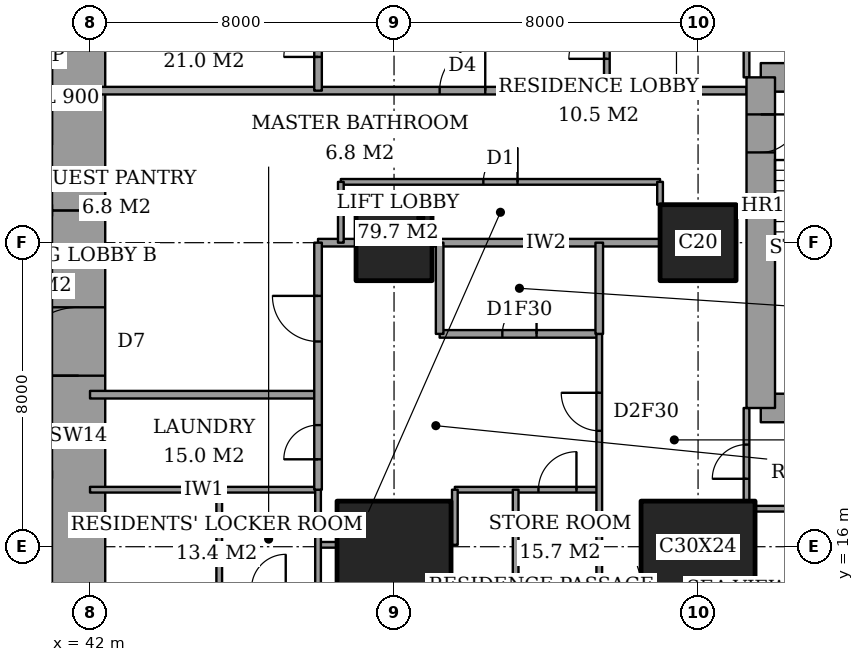
"""IFC4 building model, lengths in metres.
Left out: names, types, materials, properties, quantities, classifications, styles, units other than length and angle.
Written with IfcOpenShell. Run it as: python <this file> out.ifc"""

import sys

from ifc_helpers import new_model, si_unit, direction, frame, frame_2d, origin, origin_2d, place, context, subcontext, project, spatial, rectangle, extrude, element, fill, save


model = new_model("IFC4")
c1 = context("Model", 3, precision=1e-05, world=origin(), true_north=direction((0.0, 1.0)))
c2 = subcontext(c1, "Body", "Model", "MODEL_VIEW")
j1 = project(units=[si_unit("LENGTHUNIT", "METRE"), si_unit("PLANEANGLEUNIT", "RADIAN")], contexts=[c1])
p1 = place(None, origin())
s1 = spatial("IfcSite", under=j1, at=p1, CompositionType="ELEMENT")
p2 = place(p1, origin())
s2 = spatial("IfcBuilding", under=s1, at=p2, CompositionType="ELEMENT")
p3 = place(p2, frame((0.0, 0.0, 51.2)))
s3 = spatial("IfcBuildingStorey", under=s2, at=p3, CompositionType="ELEMENT", Elevation=51.2)
p4 = place(p3, frame((50.0, 16.0, 0.0), z_axis=(0.0, 0.0, 1.0), x_axis=(1.0, 0.0, 0.0)))
e1 = element("IfcColumn", 1, at=p4, inside=s3, PredefinedType="COLUMN", context=c2, shape_type="SweptSolid", body=[
    extrude(rectangle(XDim=3.0, YDim=2.4, at=origin_2d()), origin(), (0.0, 0.0, 1.0), 3.6),
])
p5 = place(p3, frame((50.0, 24.0, 0.0), z_axis=(0.0, 0.0, 1.0), x_axis=(1.0, 0.0, 0.0)))
e2 = element("IfcColumn", 2, at=p5, inside=s3, PredefinedType="COLUMN", context=c2, shape_type="SweptSolid", body=[
    extrude(rectangle(XDim=2.0, YDim=2.0, at=origin_2d()), origin(), (0.0, 0.0, 1.0), 3.6),
])
p6 = place(p3, frame((58.0, 16.0, 0.0), z_axis=(0.0, 0.0, 1.0), x_axis=(1.0, 0.0, 0.0)))
e3 = element("IfcColumn", 3, at=p6, inside=s3, PredefinedType="COLUMN", context=c2, shape_type="SweptSolid", body=[
    extrude(rectangle(XDim=3.0, YDim=2.4, at=origin_2d()), origin(), (0.0, 0.0, 1.0), 3.6),
])
p7 = place(p3, frame((58.0, 24.0, 0.0), z_axis=(0.0, 0.0, 1.0), x_axis=(1.0, 0.0, 0.0)))
e4 = element("IfcColumn", 4, at=p7, inside=s3, PredefinedType="COLUMN", context=c2, shape_type="SweptSolid", body=[
    extrude(rectangle(XDim=2.0, YDim=2.0, at=origin_2d()), origin(), (0.0, 0.0, 1.0), 3.6),
])
p8 = place(p3, frame((41.7, 13.0, 0.0), z_axis=(0.0, 0.0, 1.0), x_axis=(0.0, 1.0, 0.0)))
e5 = element("IfcWall", 5, at=p8, inside=s3, PredefinedType="SHEAR", context=c2, shape_type="SweptSolid", body=[
    extrude(rectangle(XDim=11.85, YDim=1.4, at=frame_2d((5.925, 0.0))), origin(), (0.0, 0.0, 1.0), 3.6),
])
p9 = place(p8, frame((7.5, 0.0, 0.0)))
e6 = element("IfcOpeningElement", 6, at=p9, cuts=e5, PredefinedType="OPENING", context=c2, shape_type="SweptSolid", body=[
    extrude(rectangle(XDim=1.8, YDim=2.4, at=frame_2d((0.9, 1.2))), frame((0.0, 0.71, 0.0), z_axis=(0.0, -1.0, 0.0), x_axis=(1.0, 0.0, 0.0)), (0.0, 0.0, 1.0), 1.42),
])
p10 = place(p3, frame((41.7, 24.85, 0.0), z_axis=(0.0, 0.0, 1.0), x_axis=(0.0, 1.0, 0.0)))
e7 = element("IfcWall", 7, at=p10, inside=s3, PredefinedType="SHEAR", context=c2, shape_type="SweptSolid", body=[
    extrude(rectangle(XDim=10.15, YDim=1.4, at=frame_2d((5.075, 0.0))), origin(), (0.0, 0.0, 1.0), 3.6),
])
for number, where, z_axis, x_axis in (
    (8, (59.65, 19.65, 0.0), (0.0, 0.0, 1.0), (1.0, 0.0, 0.0)),
    (9, (64.1, 28.35, 0.0), (0.0, 0.0, 1.0), (-1.0, 0.0, 0.0)),
):
    element("IfcWall", number, at=place(p3, frame(where, z_axis=z_axis, x_axis=x_axis)), inside=s3, PredefinedType="SHEAR", context=c2, shape_type="SweptSolid", body=[
        extrude(rectangle(XDim=4.45, YDim=0.75, at=frame_2d((2.225, 0.0))), origin(), (0.0, 0.0, 1.0), 3.6),
    ])
p11 = place(p3, frame((59.65, 28.35, 0.0), z_axis=(0.0, 0.0, 1.0), x_axis=(0.0, -1.0, 0.0)))
e10 = element("IfcWall", 10, at=p11, inside=s3, PredefinedType="SHEAR", context=c2, shape_type="SweptSolid", body=[
    extrude(rectangle(XDim=8.7, YDim=0.75, at=frame_2d((4.35, 0.0))), origin(), (0.0, 0.0, 1.0), 3.6),
])
p12 = place(p11, frame((0.975, 0.0, 0.0)))
e11 = element("IfcOpeningElement", 11, at=p12, cuts=e10, PredefinedType="OPENING", context=c2, shape_type="SweptSolid", body=[
    extrude(rectangle(XDim=1.0, YDim=2.1, at=frame_2d((0.5, 1.05))), frame((0.0, 0.385, 0.0), z_axis=(0.0, -1.0, 0.0), x_axis=(1.0, 0.0, 0.0)), (0.0, 0.0, 1.0), 0.77),
])
p13 = place(p3, frame((55.4, 15.0, 0.0), z_axis=(0.0, 0.0, 1.0), x_axis=(1.0, 0.0, 0.0)))
e12 = element("IfcWall", 12, at=p13, inside=s3, PredefinedType="PARTITIONING", context=c2, shape_type="SweptSolid", body=[
    extrude(rectangle(XDim=1.1, YDim=0.15, at=frame_2d((0.55, 0.0))), origin(), (0.0, 0.0, 1.0), 3.35),
])
p14 = place(p3, frame((48.0, 16.05, 0.0), z_axis=(0.0, 0.0, 1.0), x_axis=(1.0, 0.0, 0.0)))
e13 = element("IfcWall", 13, at=p14, inside=s3, PredefinedType="PARTITIONING", context=c2, shape_type="SweptSolid", body=[
    extrude(rectangle(XDim=0.5, YDim=0.15, at=frame_2d((0.25, 0.0))), origin(), (0.0, 0.0, 1.0), 2.634),
])
p15 = place(p3, frame((59.5, 17.0, 0.0), z_axis=(0.0, 0.0, 1.0), x_axis=(1.0, 0.0, 0.0)))
e14 = element("IfcWall", 14, at=p15, inside=s3, PredefinedType="PARTITIONING", context=c2, shape_type="SweptSolid", body=[
    extrude(rectangle(XDim=5.15, YDim=0.15, at=frame_2d((2.575, 0.0))), origin(), (0.0, 0.0, 1.0), 3.35),
])
p16 = place(p3, frame((42.0, 17.5, 0.0), z_axis=(0.0, 0.0, 1.0), x_axis=(1.0, 0.0, 0.0)))
e15 = element("IfcWall", 15, at=p16, inside=s3, PredefinedType="PARTITIONING", context=c2, shape_type="SweptSolid", body=[
    extrude(rectangle(XDim=6.0, YDim=0.15, at=frame_2d((3.0, 0.0))), origin(), (0.0, 0.0, 1.0), 3.35),
])
p17 = place(p3, frame((51.6, 17.5, 0.0), z_axis=(0.0, 0.0, 1.0), x_axis=(1.0, 0.0, 0.0)))
e16 = element("IfcWall", 16, at=p17, inside=s3, PredefinedType="PARTITIONING", context=c2, shape_type="SweptSolid", body=[
    extrude(rectangle(XDim=3.8, YDim=0.15, at=frame_2d((1.9, 0.0))), origin(), (0.0, 0.0, 1.0), 3.35),
])
p18 = place(p17, frame((2.2, 0.0, 0.0)))
e17 = element("IfcOpeningElement", 17, at=p18, cuts=e16, PredefinedType="OPENING", context=c2, shape_type="SweptSolid", body=[
    extrude(rectangle(XDim=1.0, YDim=2.1, at=frame_2d((0.5, 1.05))), frame((0.0, 0.085, 0.0), z_axis=(0.0, -1.0, 0.0), x_axis=(1.0, 0.0, 0.0)), (0.0, 0.0, 1.0), 0.17),
])
p19 = place(p3, frame((42.0, 20.0, 0.0), z_axis=(0.0, 0.0, 1.0), x_axis=(1.0, 0.0, 0.0)))
e18 = element("IfcWall", 18, at=p19, inside=s3, PredefinedType="PARTITIONING", context=c2, shape_type="SweptSolid", body=[
    extrude(rectangle(XDim=6.0, YDim=0.2, at=frame_2d((3.0, 0.0))), origin(), (0.0, 0.0, 1.0), 3.35),
])
p20 = place(p3, frame((51.2, 21.6, 0.0), z_axis=(0.0, 0.0, 1.0), x_axis=(1.0, 0.0, 0.0)))
e19 = element("IfcWall", 19, at=p20, inside=s3, PredefinedType="PARTITIONING", context=c2, shape_type="SweptSolid", body=[
    extrude(rectangle(XDim=4.2, YDim=0.2, at=frame_2d((2.1, 0.0))), origin(), (0.0, 0.0, 1.0), 3.35),
])
p21 = place(p20, frame((1.65, 0.0, 0.0)))
e20 = element("IfcOpeningElement", 20, at=p21, cuts=e19, PredefinedType="OPENING", context=c2, shape_type="SweptSolid", body=[
    extrude(rectangle(XDim=0.9, YDim=2.1, at=frame_2d((0.45, 1.05))), frame((0.0, 0.11, 0.0), z_axis=(0.0, -1.0, 0.0), x_axis=(1.0, 0.0, 0.0)), (0.0, 0.0, 1.0), 0.22),
])
p22 = place(p3, frame((48.0, 24.0, 0.0), z_axis=(0.0, 0.0, 1.0), x_axis=(1.0, 0.0, 0.0)))
e21 = element("IfcWall", 21, at=p22, inside=s3, PredefinedType="PARTITIONING", context=c2, shape_type="SweptSolid", body=[
    extrude(rectangle(XDim=1.0, YDim=0.2, at=frame_2d((0.5, 0.0))), origin(), (0.0, 0.0, 1.0), 3.35),
])
p23 = place(p3, frame((51.0, 24.0, 0.0), z_axis=(0.0, 0.0, 1.0), x_axis=(1.0, 0.0, 0.0)))
e22 = element("IfcWall", 22, at=p23, inside=s3, PredefinedType="PARTITIONING", context=c2, shape_type="SweptSolid", body=[
    extrude(rectangle(XDim=6.0, YDim=0.2, at=frame_2d((3.0, 0.0))), origin(), (0.0, 0.0, 1.0), 3.35),
])
p24 = place(p3, frame((48.6, 25.6, 0.0), z_axis=(0.0, 0.0, 1.0), x_axis=(1.0, 0.0, 0.0)))
e23 = element("IfcWall", 23, at=p24, inside=s3, PredefinedType="PARTITIONING", context=c2, shape_type="SweptSolid", body=[
    extrude(rectangle(XDim=8.4, YDim=0.15, at=frame_2d((4.2, 0.0))), origin(), (0.0, 0.0, 1.0), 3.35),
])
p25 = place(p24, frame((3.75, 0.0, 0.0)))
e24 = element("IfcOpeningElement", 24, at=p25, cuts=e23, PredefinedType="OPENING", context=c2, shape_type="SweptSolid", body=[
    extrude(rectangle(XDim=0.9, YDim=2.1, at=frame_2d((0.45, 1.05))), frame((0.0, 0.085, 0.0), z_axis=(0.0, -1.0, 0.0), x_axis=(1.0, 0.0, 0.0)), (0.0, 0.0, 1.0), 0.17),
])
p26 = place(p3, frame((42.0, 28.0, 0.0), z_axis=(0.0, 0.0, 1.0), x_axis=(1.0, 0.0, 0.0)))
e25 = element("IfcWall", 25, at=p26, inside=s3, PredefinedType="PARTITIONING", context=c2, shape_type="SweptSolid", body=[
    extrude(rectangle(XDim=17.275, YDim=0.2, at=frame_2d((8.637, 0.0))), origin(), (0.0, 0.0, 1.0), 3.35),
])
p27 = place(p26, frame((9.2, 0.0, 0.0)))
e26 = element("IfcOpeningElement", 26, at=p27, cuts=e25, PredefinedType="OPENING", context=c2, shape_type="SweptSolid", body=[
    extrude(rectangle(XDim=1.2, YDim=2.4, at=frame_2d((0.6, 1.2))), frame((0.0, 0.11, 0.0), z_axis=(0.0, -1.0, 0.0), x_axis=(1.0, 0.0, 0.0)), (0.0, 0.0, 1.0), 0.22),
])
p28 = place(p3, frame((45.4, 14.9, 0.0), z_axis=(0.0, 0.0, 1.0), x_axis=(0.0, 1.0, 0.0)))
e27 = element("IfcWall", 27, at=p28, inside=s3, PredefinedType="PARTITIONING", context=c2, shape_type="SweptSolid", body=[
    extrude(rectangle(XDim=2.6, YDim=0.15, at=frame_2d((1.3, 0.0))), origin(), (0.0, 0.0, 1.0), 3.35),
])
p29 = place(p3, frame((48.0, 17.5, 0.0), z_axis=(0.0, 0.0, 1.0), x_axis=(0.0, 1.0, 0.0)))
e28 = element("IfcWall", 28, at=p29, inside=s3, PredefinedType="PARTITIONING", context=c2, shape_type="SweptSolid", body=[
    extrude(rectangle(XDim=6.5, YDim=0.2, at=frame_2d((3.25, 0.0))), origin(), (0.0, 0.0, 1.0), 3.35),
])
p30 = place(p29, frame((3.9, 0.0, 0.0)))
e29 = element("IfcOpeningElement", 29, at=p30, cuts=e28, PredefinedType="OPENING", context=c2, shape_type="SweptSolid", body=[
    extrude(rectangle(XDim=1.2, YDim=2.4, at=frame_2d((0.6, 1.2))), frame((0.0, 0.11, 0.0), z_axis=(0.0, -1.0, 0.0), x_axis=(1.0, 0.0, 0.0)), (0.0, 0.0, 1.0), 0.22),
])
p31 = place(p29, frame((0.8, 0.0, 0.0)))
e30 = element("IfcOpeningElement", 30, at=p31, cuts=e28, PredefinedType="OPENING", context=c2, shape_type="SweptSolid", body=[
    extrude(rectangle(XDim=0.9, YDim=2.1, at=frame_2d((0.45, 1.05))), frame((0.0, 0.11, 0.0), z_axis=(0.0, -1.0, 0.0), x_axis=(1.0, 0.0, 0.0)), (0.0, 0.0, 1.0), 0.22),
])
p32 = place(p3, frame((48.0, 28.0, 0.0), z_axis=(0.0, 0.0, 1.0), x_axis=(0.0, 1.0, 0.0)))
e31 = element("IfcWall", 31, at=p32, inside=s3, PredefinedType="PARTITIONING", context=c2, shape_type="SweptSolid", body=[
    extrude(rectangle(XDim=3.5, YDim=0.2, at=frame_2d((1.75, 0.0))), origin(), (0.0, 0.0, 1.0), 3.35),
])
p33 = place(p32, frame((0.887, 0.0, 0.0)))
e32 = element("IfcOpeningElement", 32, at=p33, cuts=e31, PredefinedType="OPENING", context=c2, shape_type="SweptSolid", body=[
    extrude(rectangle(XDim=0.9, YDim=2.1, at=frame_2d((0.45, 1.05))), frame((0.0, 0.11, 0.0), z_axis=(0.0, -1.0, 0.0), x_axis=(1.0, 0.0, 0.0)), (0.0, 0.0, 1.0), 0.22),
])
p34 = place(p3, frame((48.0, 10.8, 0.0), z_axis=(0.0, 0.0, 1.0), x_axis=(0.0, 1.0, 0.0)))
e33 = element("IfcWall", 33, at=p34, inside=s3, PredefinedType="PARTITIONING", context=c2, shape_type="SweptSolid", body=[
    extrude(rectangle(XDim=6.7, YDim=0.15, at=frame_2d((3.35, 0.0))), origin(), (0.0, 0.0, 1.0), 3.35),
])
p35 = place(p3, frame((48.6, 24.0, 0.0), z_axis=(0.0, 0.0, 1.0), x_axis=(0.0, 1.0, 0.0)))
e34 = element("IfcWall", 34, at=p35, inside=s3, PredefinedType="PARTITIONING", context=c2, shape_type="SweptSolid", body=[
    extrude(rectangle(XDim=1.6, YDim=0.15, at=frame_2d((0.8, 0.0))), origin(), (0.0, 0.0, 1.0), 3.35),
])
p36 = place(p3, frame((51.2, 21.6, 0.0), z_axis=(0.0, 0.0, 1.0), x_axis=(0.0, 1.0, 0.0)))
e35 = element("IfcWall", 35, at=p36, inside=s3, PredefinedType="PARTITIONING", context=c2, shape_type="SweptSolid", body=[
    extrude(rectangle(XDim=2.4, YDim=0.2, at=frame_2d((1.2, 0.0))), origin(), (0.0, 0.0, 1.0), 3.35),
])
p37 = place(p3, frame((51.6, 16.05, 0.0), z_axis=(0.0, 0.0, 1.0), x_axis=(0.0, 1.0, 0.0)))
e36 = element("IfcWall", 36, at=p37, inside=s3, PredefinedType="PARTITIONING", context=c2, shape_type="SweptSolid", body=[
    extrude(rectangle(XDim=1.45, YDim=0.15, at=frame_2d((0.725, 0.0))), origin(), (0.0, 0.0, 1.0), 3.35),
])
p38 = place(p3, frame((53.2, 10.8, 0.0), z_axis=(0.0, 0.0, 1.0), x_axis=(0.0, 1.0, 0.0)))
e37 = element("IfcWall", 37, at=p38, inside=s3, PredefinedType="PARTITIONING", context=c2, shape_type="SweptSolid", body=[
    extrude(rectangle(XDim=6.7, YDim=0.15, at=frame_2d((3.35, 0.0))), origin(), (0.0, 0.0, 1.0), 3.35),
])
p39 = place(p3, frame((55.4, 21.6, 0.0), z_axis=(0.0, 0.0, 1.0), x_axis=(0.0, 1.0, 0.0)))
e38 = element("IfcWall", 38, at=p39, inside=s3, PredefinedType="PARTITIONING", context=c2, shape_type="SweptSolid", body=[
    extrude(rectangle(XDim=2.4, YDim=0.2, at=frame_2d((1.2, 0.0))), origin(), (0.0, 0.0, 1.0), 3.35),
])
p40 = place(p3, frame((55.4, 10.8, 0.0), z_axis=(0.0, 0.0, 1.0), x_axis=(0.0, 1.0, 0.0)))
e39 = element("IfcWall", 39, at=p40, inside=s3, PredefinedType="PARTITIONING", context=c2, shape_type="SweptSolid", body=[
    extrude(rectangle(XDim=10.8, YDim=0.15, at=frame_2d((5.4, 0.0))), origin(), (0.0, 0.0, 1.0), 3.35),
])
p41 = place(p40, frame((8.25, 0.0, 0.0)))
e40 = element("IfcOpeningElement", 40, at=p41, cuts=e39, PredefinedType="OPENING", context=c2, shape_type="SweptSolid", body=[
    extrude(rectangle(XDim=1.0, YDim=2.1, at=frame_2d((0.5, 1.05))), frame((0.0, 0.085, 0.0), z_axis=(0.0, -1.0, 0.0), x_axis=(1.0, 0.0, 0.0)), (0.0, 0.0, 1.0), 0.17),
])
p42 = place(p3, frame((55.6, 28.0, 0.0), z_axis=(0.0, 0.0, 1.0), x_axis=(0.0, 1.0, 0.0)))
e41 = element("IfcWall", 41, at=p42, inside=s3, PredefinedType="PARTITIONING", context=c2, shape_type="SweptSolid", body=[
    extrude(rectangle(XDim=9.0, YDim=0.15, at=frame_2d((4.5, 0.0))), origin(), (0.0, 0.0, 1.0), 3.35),
])
p43 = place(p42, frame((0.837, 0.0, 0.0)))
e42 = element("IfcOpeningElement", 42, at=p43, cuts=e41, PredefinedType="OPENING", context=c2, shape_type="SweptSolid", body=[
    extrude(rectangle(XDim=1.0, YDim=2.1, at=frame_2d((0.5, 1.05))), frame((0.0, 0.085, 0.0), z_axis=(0.0, -1.0, 0.0), x_axis=(1.0, 0.0, 0.0)), (0.0, 0.0, 1.0), 0.17),
])
p44 = place(p3, frame((57.0, 25.0, 0.0), z_axis=(0.0, 0.0, 1.0), x_axis=(0.0, 1.0, 0.0)))
e43 = element("IfcWall", 43, at=p44, inside=s3, PredefinedType="PARTITIONING", context=c2, shape_type="SweptSolid", body=[
    extrude(rectangle(XDim=0.6, YDim=0.15, at=frame_2d((0.3, 0.0))), origin(), (0.0, 0.0, 1.0), 3.35),
])
p45 = place(p3, frame((59.275, 17.2, 0.0), z_axis=(0.0, 0.0, 1.0), x_axis=(0.0, 1.0, 0.0)))
e44 = element("IfcWall", 44, at=p45, inside=s3, PredefinedType="PARTITIONING", context=c2, shape_type="SweptSolid", body=[
    extrude(rectangle(XDim=2.45, YDim=0.15, at=frame_2d((1.225, 0.0))), origin(), (0.0, 0.0, 1.0), 3.35),
])
p46 = place(p45, frame((0.587, 0.0, 0.0)))
e45 = element("IfcOpeningElement", 45, at=p46, cuts=e44, PredefinedType="OPENING", context=c2, shape_type="SweptSolid", body=[
    extrude(rectangle(XDim=0.9, YDim=2.1, at=frame_2d((0.45, 1.05))), frame((0.0, 0.085, 0.0), z_axis=(0.0, -1.0, 0.0), x_axis=(1.0, 0.0, 0.0)), (0.0, 0.0, 1.0), 0.17),
])
p47 = place(p3, frame((59.275, 28.35, 0.0), z_axis=(0.0, 0.0, 1.0), x_axis=(0.0, 1.0, 0.0)))
e46 = element("IfcWall", 46, at=p47, inside=s3, PredefinedType="PARTITIONING", context=c2, shape_type="SweptSolid", body=[
    extrude(rectangle(XDim=2.45, YDim=0.15, at=frame_2d((1.225, 0.0))), origin(), (0.0, 0.0, 1.0), 3.35),
])
p48 = place(p47, frame((0.913, 0.0, 0.0)))
e47 = element("IfcOpeningElement", 47, at=p48, cuts=e46, PredefinedType="OPENING", context=c2, shape_type="SweptSolid", body=[
    extrude(rectangle(XDim=1.0, YDim=2.1, at=frame_2d((0.5, 1.05))), frame((0.0, 0.085, 0.0), z_axis=(0.0, -1.0, 0.0), x_axis=(1.0, 0.0, 0.0)), (0.0, 0.0, 1.0), 0.17),
])
p49 = place(p3, frame((28.3, 17.9, 0.0), z_axis=(0.0, 0.0, 1.0), x_axis=(1.0, 0.0, 0.0)))
e48 = element("IfcWall", 48, at=p49, inside=s3, PredefinedType="PARTITIONING", context=c2, shape_type="SweptSolid", body=[
    extrude(rectangle(XDim=12.7, YDim=0.2, at=frame_2d((6.35, 0.0))), origin(), (0.0, 0.0, 1.0), 3.6),
])
p50 = place(p49, frame((0.95, 0.0, 0.0)))
e49 = element("IfcOpeningElement", 49, at=p50, cuts=e48, PredefinedType="OPENING", context=c2, shape_type="SweptSolid", body=[
    extrude(rectangle(XDim=1.1, YDim=2.1, at=frame_2d((0.55, 1.05))), frame((0.0, 0.11, 0.0), z_axis=(0.0, -1.0, 0.0), x_axis=(1.0, 0.0, 0.0)), (0.0, 0.0, 1.0), 0.22),
])
p51 = place(p49, frame((4.15, 0.0, 0.0)))
e50 = element("IfcOpeningElement", 50, at=p51, cuts=e48, PredefinedType="OPENING", context=c2, shape_type="SweptSolid", body=[
    extrude(rectangle(XDim=1.1, YDim=2.1, at=frame_2d((0.55, 1.05))), frame((0.0, 0.11, 0.0), z_axis=(0.0, -1.0, 0.0), x_axis=(1.0, 0.0, 0.0)), (0.0, 0.0, 1.0), 0.22),
])
p52 = place(p49, frame((7.35, 0.0, 0.0)))
e51 = element("IfcOpeningElement", 51, at=p52, cuts=e48, PredefinedType="OPENING", context=c2, shape_type="SweptSolid", body=[
    extrude(rectangle(XDim=1.1, YDim=2.1, at=frame_2d((0.55, 1.05))), frame((0.0, 0.11, 0.0), z_axis=(0.0, -1.0, 0.0), x_axis=(1.0, 0.0, 0.0)), (0.0, 0.0, 1.0), 0.22),
])
p53 = place(p49, frame((10.6, 0.0, 0.0)))
e52 = element("IfcOpeningElement", 52, at=p53, cuts=e48, PredefinedType="OPENING", context=c2, shape_type="SweptSolid", body=[
    extrude(rectangle(XDim=1.2, YDim=2.1, at=frame_2d((0.6, 1.05))), frame((0.0, 0.11, 0.0), z_axis=(0.0, -1.0, 0.0), x_axis=(1.0, 0.0, 0.0)), (0.0, 0.0, 1.0), 0.22),
])
p54 = place(p46, origin())
e53 = element("IfcDoor", 53, at=p54, inside=s3, OperationType="SINGLE_SWING_RIGHT", PredefinedType="DOOR", context=c2, shape_type="SweptSolid", body=[
    extrude(rectangle(XDim=0.9, YDim=2.1, at=frame_2d((0.45, 1.05))), frame((0.0, 0.025, 0.0), z_axis=(0.0, -1.0, 0.0), x_axis=(1.0, 0.0, 0.0)), (0.0, 0.0, 1.0), 0.05),
])
fill(e45, e53)
p55 = place(p41, origin())
e54 = element("IfcDoor", 54, at=p55, inside=s3, OperationType="SINGLE_SWING_LEFT", PredefinedType="DOOR", context=c2, shape_type="SweptSolid", body=[
    extrude(rectangle(XDim=1.0, YDim=2.1, at=frame_2d((0.5, 1.05))), frame((0.0, 0.025, 0.0), z_axis=(0.0, -1.0, 0.0), x_axis=(1.0, 0.0, 0.0)), (0.0, 0.0, 1.0), 0.05),
])
fill(e40, e54)
p56 = place(p21, origin())
e55 = element("IfcDoor", 55, at=p56, inside=s3, OperationType="SINGLE_SWING_LEFT", PredefinedType="DOOR", context=c2, shape_type="SweptSolid", body=[
    extrude(rectangle(XDim=0.9, YDim=2.1, at=frame_2d((0.45, 1.05))), frame((0.0, 0.025, 0.0), z_axis=(0.0, -1.0, 0.0), x_axis=(1.0, 0.0, 0.0)), (0.0, 0.0, 1.0), 0.05),
])
fill(e20, e55)
p57 = place(p30, origin())
e56 = element("IfcDoor", 56, at=p57, inside=s3, OperationType="SINGLE_SWING_LEFT", PredefinedType="DOOR", context=c2, shape_type="SweptSolid", body=[
    extrude(rectangle(XDim=1.2, YDim=2.4, at=frame_2d((0.6, 1.2))), frame((0.0, 0.025, 0.0), z_axis=(0.0, -1.0, 0.0), x_axis=(1.0, 0.0, 0.0)), (0.0, 0.0, 1.0), 0.05),
])
fill(e29, e56)
p58 = place(p18, origin())
e57 = element("IfcDoor", 57, at=p58, inside=s3, OperationType="SINGLE_SWING_LEFT", PredefinedType="DOOR", context=c2, shape_type="SweptSolid", body=[
    extrude(rectangle(XDim=1.0, YDim=2.1, at=frame_2d((0.5, 1.05))), frame((0.0, 0.025, 0.0), z_axis=(0.0, -1.0, 0.0), x_axis=(1.0, 0.0, 0.0)), (0.0, 0.0, 1.0), 0.05),
])
fill(e17, e57)
p59 = place(p31, origin())
e58 = element("IfcDoor", 58, at=p59, inside=s3, OperationType="SINGLE_SWING_RIGHT", PredefinedType="DOOR", context=c2, shape_type="SweptSolid", body=[
    extrude(rectangle(XDim=0.9, YDim=2.1, at=frame_2d((0.45, 1.05))), frame((0.0, 0.025, 0.0), z_axis=(0.0, -1.0, 0.0), x_axis=(1.0, 0.0, 0.0)), (0.0, 0.0, 1.0), 0.05),
])
fill(e30, e58)
p60 = place(p43, origin())
e59 = element("IfcDoor", 59, at=p60, inside=s3, OperationType="SINGLE_SWING_RIGHT", PredefinedType="DOOR", context=c2, shape_type="SweptSolid", body=[
    extrude(rectangle(XDim=1.0, YDim=2.1, at=frame_2d((0.5, 1.05))), frame((0.0, 0.025, 0.0), z_axis=(0.0, -1.0, 0.0), x_axis=(1.0, 0.0, 0.0)), (0.0, 0.0, 1.0), 0.05),
])
fill(e42, e59)
p61 = place(p27, origin())
e60 = element("IfcDoor", 60, at=p61, inside=s3, OperationType="SINGLE_SWING_LEFT", PredefinedType="DOOR", context=c2, shape_type="SweptSolid", body=[
    extrude(rectangle(XDim=1.2, YDim=2.4, at=frame_2d((0.6, 1.2))), frame((0.0, 0.025, 0.0), z_axis=(0.0, -1.0, 0.0), x_axis=(1.0, 0.0, 0.0)), (0.0, 0.0, 1.0), 0.05),
])
fill(e26, e60)
p62 = place(p33, origin())
e61 = element("IfcDoor", 61, at=p62, inside=s3, OperationType="SINGLE_SWING_RIGHT", PredefinedType="DOOR", context=c2, shape_type="SweptSolid", body=[
    extrude(rectangle(XDim=0.9, YDim=2.1, at=frame_2d((0.45, 1.05))), frame((0.0, 0.025, 0.0), z_axis=(0.0, -1.0, 0.0), x_axis=(1.0, 0.0, 0.0)), (0.0, 0.0, 1.0), 0.05),
])
fill(e32, e61)
p63 = place(p25, origin())
e62 = element("IfcDoor", 62, at=p63, inside=s3, OperationType="SINGLE_SWING_LEFT", PredefinedType="DOOR", context=c2, shape_type="SweptSolid", body=[
    extrude(rectangle(XDim=0.9, YDim=2.1, at=frame_2d((0.45, 1.05))), frame((0.0, 0.025, 0.0), z_axis=(0.0, -1.0, 0.0), x_axis=(1.0, 0.0, 0.0)), (0.0, 0.0, 1.0), 0.05),
])
fill(e24, e62)
p64 = place(p9, origin())
e63 = element("IfcDoor", 63, at=p64, inside=s3, OperationType="DOUBLE_DOOR_DOUBLE_SWING", PredefinedType="DOOR", context=c2, shape_type="SweptSolid", body=[
    extrude(rectangle(XDim=1.8, YDim=2.4, at=frame_2d((0.9, 1.2))), frame((0.0, 0.025, 0.0), z_axis=(0.0, -1.0, 0.0), x_axis=(1.0, 0.0, 0.0)), (0.0, 0.0, 1.0), 0.05),
])
fill(e6, e63)
p65 = place(p12, origin())
e64 = element("IfcDoor", 64, at=p65, inside=s3, OperationType="SINGLE_SWING_RIGHT", PredefinedType="DOOR", context=c2, shape_type="SweptSolid", body=[
    extrude(rectangle(XDim=1.0, YDim=2.1, at=frame_2d((0.5, 1.05))), frame((0.0, 0.025, 0.0), z_axis=(0.0, -1.0, 0.0), x_axis=(1.0, 0.0, 0.0)), (0.0, 0.0, 1.0), 0.05),
])
fill(e11, e64)
save(model, sys.argv[1])
